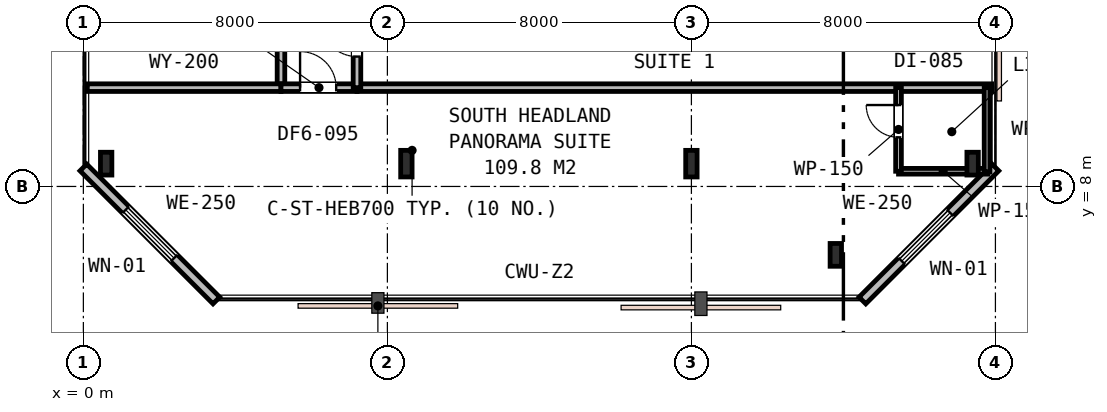
"""IFC4 building model, lengths in metres.
Left out: names, types, materials, properties, quantities, classifications, styles, units other than length and angle.
Written with IfcOpenShell. Run it as: python <this file> out.ifc"""

import sys

from ifc_helpers import new_model, si_unit, direction, frame, frame_2d, origin, origin_2d, place, context, subcontext, project, spatial, rectangle, i_section, extrude, element, fill, save


model = new_model("IFC4")
c1 = context("Model", 3, precision=1e-05, world=origin(), true_north=direction((0.0, 1.0)))
c2 = subcontext(c1, "Body", "Model", "MODEL_VIEW")
j1 = project(units=[si_unit("LENGTHUNIT", "METRE"), si_unit("PLANEANGLEUNIT", "RADIAN")], contexts=[c1])
p1 = place(None, origin())
s1 = spatial("IfcSite", under=j1, at=p1, CompositionType="ELEMENT")
p2 = place(p1, origin())
s2 = spatial("IfcBuilding", under=s1, at=p2, CompositionType="ELEMENT")
p3 = place(p2, frame((0.0, 0.0, 129.6)))
s3 = spatial("IfcBuildingStorey", under=s2, at=p3, CompositionType="ELEMENT", Elevation=129.6)
for number, where, z_axis, x_axis in (
    (1, (0.6, 8.6, 0.0), (0.0, 0.0, 1.0), (1.0, 0.0, 0.0)),
    (2, (19.8, 6.2, 0.0), (0.0, 0.0, 1.0), (1.0, 0.0, 0.0)),
    (3, (23.4, 8.6, 0.0), (0.0, 0.0, 1.0), (1.0, 0.0, 0.0)),
):
    element("IfcColumn", number, at=place(p3, frame(where, z_axis=z_axis, x_axis=x_axis)), inside=s3, PredefinedType="COLUMN", context=c2, shape_type="SweptSolid", body=[
        extrude(i_section(OverallWidth=0.3, OverallDepth=0.6, WebThickness=0.015, FlangeThickness=0.03, FilletRadius=0.027, at=origin_2d()), origin(), (0.0, 0.0, 1.0), 3.6),
    ])
for number, where, z_axis, x_axis in (
    (4, (8.5, 8.6, 0.0), (0.0, 0.0, 1.0), (1.0, 0.0, 0.0)),
    (5, (16.0, 8.6, 0.0), (0.0, 0.0, 1.0), (1.0, 0.0, 0.0)),
):
    element("IfcColumn", number, at=place(p3, frame(where, z_axis=z_axis, x_axis=x_axis)), inside=s3, PredefinedType="COLUMN", context=c2, shape_type="SweptSolid", body=[
        extrude(i_section(OverallWidth=0.3, OverallDepth=0.7, WebThickness=0.017, FlangeThickness=0.032, FilletRadius=0.027, at=origin_2d()), origin(), (0.0, 0.0, 1.0), 3.6),
    ])
p4 = place(p3, frame((20.5, 5.0, 0.0), z_axis=(0.0, 0.0, 1.0), x_axis=(0.707106781187, 0.707106781187, 0.0)))
e6 = element("IfcWall", 6, at=p4, inside=s3, PredefinedType="STANDARD", context=c2, shape_type="SweptSolid", body=[
    extrude(rectangle(XDim=4.95, YDim=0.25, at=frame_2d((2.475, 0.0))), origin(), (0.0, 0.0, 1.0), 3.33),
])
p5 = place(p4, frame((1.465, 0.0, 0.75)))
e7 = element("IfcOpeningElement", 7, at=p5, cuts=e6, PredefinedType="OPENING", context=c2, shape_type="SweptSolid", body=[
    extrude(rectangle(XDim=1.8, YDim=1.85, at=frame_2d((0.9, 0.925))), frame((0.0, 0.135, 0.0), z_axis=(0.0, -1.0, 0.0), x_axis=(1.0, 0.0, 0.0)), (0.0, 0.0, 1.0), 0.27),
])
p6 = place(p3, frame((0.0, 8.5, 0.0), z_axis=(0.0, 0.0, 1.0), x_axis=(0.707106781187, -0.707106781187, 0.0)))
e8 = element("IfcWall", 8, at=p6, inside=s3, PredefinedType="STANDARD", context=c2, shape_type="SweptSolid", body=[
    extrude(rectangle(XDim=4.95, YDim=0.25, at=frame_2d((2.475, 0.0))), origin(), (0.0, 0.0, 1.0), 3.33),
])
p7 = place(p6, frame((1.575, 0.0, 0.75)))
e9 = element("IfcOpeningElement", 9, at=p7, cuts=e8, PredefinedType="OPENING", context=c2, shape_type="SweptSolid", body=[
    extrude(rectangle(XDim=1.8, YDim=1.85, at=frame_2d((0.9, 0.925))), frame((0.0, 0.135, 0.0), z_axis=(0.0, -1.0, 0.0), x_axis=(1.0, 0.0, 0.0)), (0.0, 0.0, 1.0), 0.27),
])
p8 = place(p3, frame((5.2, 10.6, 0.0), z_axis=(0.0, 0.0, 1.0), x_axis=(0.0, 1.0, 0.0)))
e10 = element("IfcWall", 10, at=p8, inside=s3, PredefinedType="PARTITIONING", context=c2, shape_type="SweptSolid", body=[
    extrude(rectangle(XDim=20.2, YDim=0.2, at=frame_2d((10.1, 0.0))), origin(), (0.0, 0.0, 1.0), 2.87),
])
p9 = place(p8, frame((8.425, 0.0, 0.0)))
e11 = element("IfcOpeningElement", 11, at=p9, cuts=e10, PredefinedType="OPENING", context=c2, shape_type="SweptSolid", body=[
    extrude(rectangle(XDim=0.95, YDim=2.15, at=frame_2d((0.475, 1.075))), frame((0.0, 0.11, 0.0), z_axis=(0.0, -1.0, 0.0), x_axis=(1.0, 0.0, 0.0)), (0.0, 0.0, 1.0), 0.22),
])
p10 = place(p8, frame((14.68, 0.0, 0.0)))
e12 = element("IfcOpeningElement", 12, at=p10, cuts=e10, PredefinedType="OPENING", context=c2, shape_type="SweptSolid", body=[
    extrude(rectangle(XDim=0.95, YDim=2.15, at=frame_2d((0.475, 1.075))), frame((0.0, 0.11, 0.0), z_axis=(0.0, -1.0, 0.0), x_axis=(1.0, 0.0, 0.0)), (0.0, 0.0, 1.0), 0.22),
])
p11 = place(p8, frame((3.225, 0.0, 0.0)))
e13 = element("IfcOpeningElement", 13, at=p11, cuts=e10, PredefinedType="OPENING", context=c2, shape_type="SweptSolid", body=[
    extrude(rectangle(XDim=0.95, YDim=2.15, at=frame_2d((0.475, 1.075))), frame((0.0, 0.11, 0.0), z_axis=(0.0, -1.0, 0.0), x_axis=(1.0, 0.0, 0.0)), (0.0, 0.0, 1.0), 0.22),
])
p12 = place(p3, frame((0.1, 10.6, 0.0), z_axis=(0.0, 0.0, 1.0), x_axis=(1.0, 0.0, 0.0)))
e14 = element("IfcWall", 14, at=p12, inside=s3, PredefinedType="PARTITIONING", context=c2, shape_type="SweptSolid", body=[
    extrude(rectangle(XDim=5.1, YDim=0.2, at=frame_2d((2.55, 0.0))), origin(), (0.0, 0.0, 1.0), 2.96),
])
p13 = place(p3, frame((7.2, 10.6, 0.0), z_axis=(0.0, 0.0, 1.0), x_axis=(1.0, 0.0, 0.0)))
e15 = element("IfcWall", 15, at=p13, inside=s3, PredefinedType="PARTITIONING", context=c2, shape_type="SweptSolid", body=[
    extrude(rectangle(XDim=16.7, YDim=0.2, at=frame_2d((8.35, 0.0))), origin(), (0.0, 0.0, 1.0), 2.87),
])
p14 = place(p3, frame((5.2, 10.6, 0.0), z_axis=(0.0, 0.0, 1.0), x_axis=(1.0, 0.0, 0.0)))
e16 = element("IfcWall", 16, at=p14, inside=s3, PredefinedType="PARTITIONING", context=c2, shape_type="SweptSolid", body=[
    extrude(rectangle(XDim=2.0, YDim=0.2, at=frame_2d((1.0, 0.0))), origin(), (0.0, 0.0, 1.0), 3.01),
])
p15 = place(p14, frame((0.502, 0.0, 0.0)))
e17 = element("IfcOpeningElement", 17, at=p15, cuts=e16, PredefinedType="OPENING", context=c2, shape_type="SweptSolid", body=[
    extrude(rectangle(XDim=0.95, YDim=2.15, at=frame_2d((0.475, 1.075))), frame((0.0, 0.11, 0.0), z_axis=(0.0, -1.0, 0.0), x_axis=(1.0, 0.0, 0.0)), (0.0, 0.0, 1.0), 0.22),
])
p16 = place(p3, frame((21.45, 8.4, 0.0), z_axis=(0.0, 0.0, 1.0), x_axis=(1.0, 0.0, 0.0)))
e18 = element("IfcWall", 18, at=p16, inside=s3, PredefinedType="PARTITIONING", context=c2, shape_type="SweptSolid", body=[
    extrude(rectangle(XDim=2.35, YDim=0.15, at=frame_2d((1.175, 0.0))), origin(), (0.0, 0.0, 1.0), 2.87),
])
p17 = place(p3, frame((21.45, 8.4, 0.0), z_axis=(0.0, 0.0, 1.0), x_axis=(0.0, 1.0, 0.0)))
e19 = element("IfcWall", 19, at=p17, inside=s3, PredefinedType="PARTITIONING", context=c2, shape_type="SweptSolid", body=[
    extrude(rectangle(XDim=2.2, YDim=0.15, at=frame_2d((1.1, 0.0))), origin(), (0.0, 0.0, 1.0), 2.87),
])
p18 = place(p17, frame((0.892, 0.0, 0.0)))
e20 = element("IfcOpeningElement", 20, at=p18, cuts=e19, PredefinedType="OPENING", context=c2, shape_type="SweptSolid", body=[
    extrude(rectangle(XDim=0.85, YDim=2.15, at=frame_2d((0.425, 1.075))), frame((0.0, 0.085, 0.0), z_axis=(0.0, -1.0, 0.0), x_axis=(1.0, 0.0, 0.0)), (0.0, 0.0, 1.0), 0.17),
])
p19 = place(p3, frame((23.78, 10.6, 0.0), z_axis=(0.0, 0.0, 1.0), x_axis=(0.0, -1.0, 0.0)))
e21 = element("IfcWall", 21, at=p19, inside=s3, PredefinedType="PARTITIONING", context=c2, shape_type="SweptSolid", body=[
    extrude(rectangle(XDim=2.22, YDim=0.15, at=frame_2d((1.11, 0.0))), origin(), (0.0, 0.0, 1.0), 2.87),
])
p20 = place(p3, frame((7.2, 10.6, 0.0), z_axis=(0.0, 0.0, 1.0), x_axis=(0.0, 1.0, 0.0)))
e22 = element("IfcWall", 22, at=p20, inside=s3, PredefinedType="PARTITIONING", context=c2, shape_type="SweptSolid", body=[
    extrude(rectangle(XDim=18.0, YDim=0.2, at=frame_2d((9.0, 0.0))), origin(), (0.0, 0.0, 1.0), 2.87),
])
p21 = place(p20, frame((0.818, 0.0, 0.0)))
e23 = element("IfcOpeningElement", 23, at=p21, cuts=e22, PredefinedType="OPENING", context=c2, shape_type="SweptSolid", body=[
    extrude(rectangle(XDim=0.95, YDim=2.15, at=frame_2d((0.475, 1.075))), frame((0.0, 0.11, 0.0), z_axis=(0.0, -1.0, 0.0), x_axis=(1.0, 0.0, 0.0)), (0.0, 0.0, 1.0), 0.22),
])
p22 = place(p20, frame((5.169, 0.0, 0.0)))
e24 = element("IfcOpeningElement", 24, at=p22, cuts=e22, PredefinedType="OPENING", context=c2, shape_type="SweptSolid", body=[
    extrude(rectangle(XDim=0.95, YDim=2.15, at=frame_2d((0.475, 1.075))), frame((0.0, 0.11, 0.0), z_axis=(0.0, -1.0, 0.0), x_axis=(1.0, 0.0, 0.0)), (0.0, 0.0, 1.0), 0.22),
])
p23 = place(p20, frame((9.815, 0.0, 0.0)))
e25 = element("IfcOpeningElement", 25, at=p23, cuts=e22, PredefinedType="OPENING", context=c2, shape_type="SweptSolid", body=[
    extrude(rectangle(XDim=0.95, YDim=2.15, at=frame_2d((0.475, 1.075))), frame((0.0, 0.11, 0.0), z_axis=(0.0, -1.0, 0.0), x_axis=(1.0, 0.0, 0.0)), (0.0, 0.0, 1.0), 0.22),
])
p24 = place(p20, frame((15.325, 0.0, 0.0)))
e26 = element("IfcOpeningElement", 26, at=p24, cuts=e22, PredefinedType="OPENING", context=c2, shape_type="SweptSolid", body=[
    extrude(rectangle(XDim=0.95, YDim=2.15, at=frame_2d((0.475, 1.075))), frame((0.0, 0.11, 0.0), z_axis=(0.0, -1.0, 0.0), x_axis=(1.0, 0.0, 0.0)), (0.0, 0.0, 1.0), 0.22),
])
p25 = place(p5, origin())
e27 = element("IfcWindow", 27, at=p25, inside=s3, PartitioningType="SINGLE_PANEL", PredefinedType="WINDOW", context=c2, shape_type="SweptSolid", body=[
    extrude(rectangle(XDim=1.8, YDim=1.85, at=frame_2d((0.9, 0.925))), frame((0.0, 0.03, 0.0), z_axis=(0.0, -1.0, 0.0), x_axis=(1.0, 0.0, 0.0)), (0.0, 0.0, 1.0), 0.06),
])
fill(e7, e27)
p26 = place(p7, origin())
e28 = element("IfcWindow", 28, at=p26, inside=s3, PartitioningType="SINGLE_PANEL", PredefinedType="WINDOW", context=c2, shape_type="SweptSolid", body=[
    extrude(rectangle(XDim=1.8, YDim=1.85, at=frame_2d((0.9, 0.925))), frame((0.0, 0.03, 0.0), z_axis=(0.0, -1.0, 0.0), x_axis=(1.0, 0.0, 0.0)), (0.0, 0.0, 1.0), 0.06),
])
fill(e9, e28)
p27 = place(p15, origin())
e29 = element("IfcDoor", 29, at=p27, inside=s3, OperationType="SINGLE_SWING_LEFT", PredefinedType="DOOR", context=c2, shape_type="SweptSolid", body=[
    extrude(rectangle(XDim=0.95, YDim=2.15, at=frame_2d((0.475, 1.075))), frame((0.0, 0.025, 0.0), z_axis=(0.0, -1.0, 0.0), x_axis=(1.0, 0.0, 0.0)), (0.0, 0.0, 1.0), 0.05),
])
fill(e17, e29)
p28 = place(p18, origin())
e30 = element("IfcDoor", 30, at=p28, inside=s3, OperationType="SINGLE_SWING_RIGHT", PredefinedType="DOOR", context=c2, shape_type="SweptSolid", body=[
    extrude(rectangle(XDim=0.85, YDim=2.15, at=frame_2d((0.425, 1.075))), frame((0.0, 0.025, 0.0), z_axis=(0.0, -1.0, 0.0), x_axis=(1.0, 0.0, 0.0)), (0.0, 0.0, 1.0), 0.05),
])
fill(e20, e30)
p29 = place(p21, origin())
e31 = element("IfcDoor", 31, at=p29, inside=s3, OperationType="SINGLE_SWING_RIGHT", PredefinedType="DOOR", context=c2, shape_type="SweptSolid", body=[
    extrude(rectangle(XDim=0.95, YDim=2.15, at=frame_2d((0.475, 1.075))), frame((0.0, 0.025, 0.0), z_axis=(0.0, -1.0, 0.0), x_axis=(1.0, 0.0, 0.0)), (0.0, 0.0, 1.0), 0.05),
])
fill(e23, e31)
save(model, sys.argv[1])
